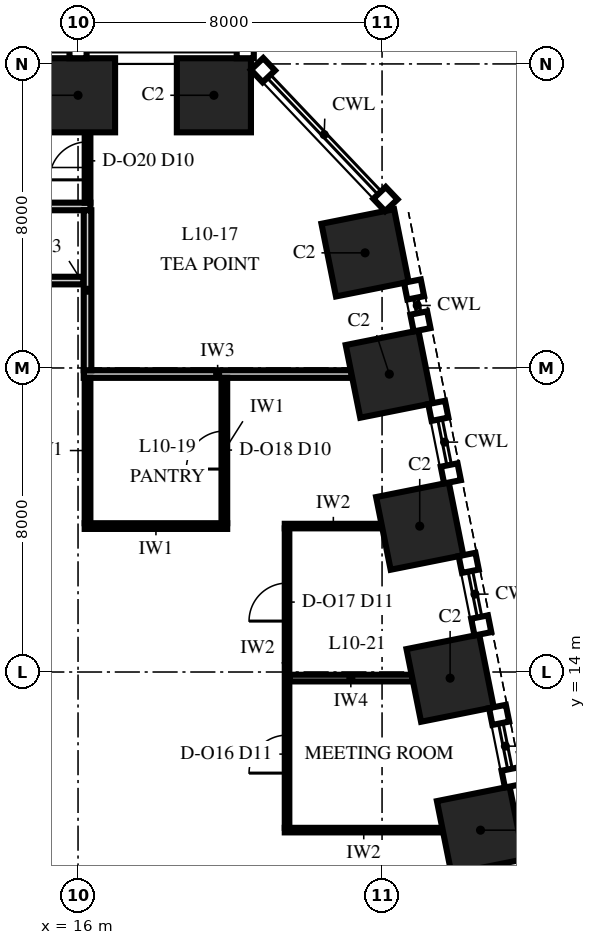
"""IFC4 building model, lengths in metres.
Left out: names, types, materials, properties, quantities, classifications, styles, units other than length and angle.
Written with IfcOpenShell. Run it as: python <this file> out.ifc"""

import sys

from ifc_helpers import new_model, si_unit, direction, frame, frame_2d, origin, origin_2d, place, context, subcontext, project, spatial, rectangle, extrude, element, fill, save


model = new_model("IFC4")
c1 = context("Model", 3, precision=1e-05, world=origin(), true_north=direction((0.0, 1.0)))
c2 = subcontext(c1, "Body", "Model", "MODEL_VIEW")
j1 = project(units=[si_unit("LENGTHUNIT", "METRE"), si_unit("PLANEANGLEUNIT", "RADIAN")], contexts=[c1])
p1 = place(None, origin())
s1 = spatial("IfcSite", under=j1, at=p1, CompositionType="ELEMENT")
p2 = place(p1, origin())
s2 = spatial("IfcBuilding", under=s1, at=p2, CompositionType="ELEMENT")
p3 = place(p2, frame((0.0, 0.0, 52.0)))
s3 = spatial("IfcBuildingStorey", under=s2, at=p3, CompositionType="ELEMENT", Elevation=52.0)
for number, where, z_axis, x_axis in (
    (1, (26.591, 9.838, 0.0), (0.0, 0.0, 1.0), (-0.196, 0.981, 0.0)),
    (2, (25.791, 13.838, 0.0), (0.0, 0.0, 1.0), (-0.196, 0.981, 0.0)),
    (3, (24.991, 17.838, 0.0), (0.0, 0.0, 1.0), (-0.196, 0.981, 0.0)),
    (4, (24.191, 21.838, 0.0), (0.0, 0.0, 1.0), (-0.196, 0.981, 0.0)),
    (5, (23.553, 25.029, 0.0), (0.0, 0.0, 1.0), (-0.196, 0.981, 0.0)),
    (6, (19.575, 29.175, 0.0), (0.0, 0.0, 1.0), (-1.0, 0.0, 0.0)),
    (7, (16.0, 29.175, 0.0), (0.0, 0.0, 1.0), (-1.0, 0.0, 0.0)),
):
    element("IfcColumn", number, at=place(p3, frame(where, z_axis=z_axis, x_axis=x_axis)), inside=s3, PredefinedType="COLUMN", context=c2, shape_type="SweptSolid", body=[
        extrude(rectangle(XDim=1.95, YDim=1.95, at=origin_2d()), origin(), (0.0, 0.0, 1.0), 4.0),
    ])
p4 = place(p3, frame((21.44, 9.84, 0.0), z_axis=(0.0, 0.0, 1.0), x_axis=(1.0, 0.0, 0.0)))
e8 = element("IfcWall", 8, at=p4, inside=s3, PredefinedType="PARTITIONING", context=c2, shape_type="SweptSolid", body=[
    extrude(rectangle(XDim=4.156, YDim=0.12, at=frame_2d((2.078, 0.0))), origin(), (0.0, 0.0, 1.0), 3.25),
])
p5 = place(p3, frame((21.56, 13.84, 0.0), z_axis=(0.0, 0.0, 1.0), x_axis=(1.0, 0.0, 0.0)))
e9 = element("IfcWall", 9, at=p5, inside=s3, PredefinedType="PARTITIONING", context=c2, shape_type="SweptSolid", body=[
    extrude(rectangle(XDim=3.236, YDim=0.175, at=frame_2d((1.618, 0.0))), origin(), (0.0, 0.0, 1.0), 3.25),
])
p6 = place(p3, frame((16.175, 17.84, 0.0), z_axis=(0.0, 0.0, 1.0), x_axis=(1.0, 0.0, 0.0)))
e10 = element("IfcWall", 10, at=p6, inside=s3, PredefinedType="PARTITIONING", context=c2, shape_type="SweptSolid", body=[
    extrude(rectangle(XDim=3.75, YDim=0.15, at=frame_2d((1.875, 0.0))), origin(), (0.0, 0.0, 1.0), 3.25),
])
p7 = place(p3, frame((21.44, 17.84, 0.0), z_axis=(0.0, 0.0, 1.0), x_axis=(1.0, 0.0, 0.0)))
e11 = element("IfcWall", 11, at=p7, inside=s3, PredefinedType="PARTITIONING", context=c2, shape_type="SweptSolid", body=[
    extrude(rectangle(XDim=2.556, YDim=0.12, at=frame_2d((1.278, 0.0))), origin(), (0.0, 0.0, 1.0), 3.25),
])
p8 = place(p3, frame((16.15, 21.84, 0.0), z_axis=(0.0, 0.0, 1.0), x_axis=(1.0, 0.0, 0.0)))
e12 = element("IfcWall", 12, at=p8, inside=s3, PredefinedType="PARTITIONING", context=c2, shape_type="SweptSolid", body=[
    extrude(rectangle(XDim=7.046, YDim=0.2, at=frame_2d((3.523, 0.0))), origin(), (0.0, 0.0, 1.0), 3.25),
])
p9 = place(p3, frame((14.33, 24.3, 0.0), z_axis=(0.0, 0.0, 1.0), x_axis=(1.0, 0.0, 0.0)))
e13 = element("IfcWall", 13, at=p9, inside=s3, PredefinedType="PARTITIONING", context=c2, shape_type="SweptSolid", body=[
    extrude(rectangle(XDim=1.82, YDim=0.2, at=frame_2d((0.91, 0.0))), origin(), (0.0, 0.0, 1.0), 3.4),
])
p10 = place(p3, frame((-16.31, 26.25, 0.0), z_axis=(0.0, 0.0, 1.0), x_axis=(1.0, 0.0, 0.0)))
e14 = element("IfcWall", 14, at=p10, inside=s3, PredefinedType="PARTITIONING", context=c2, shape_type="SweptSolid", body=[
    extrude(rectangle(XDim=32.635, YDim=0.2, at=frame_2d((16.317, 0.0))), origin(), (0.0, 0.0, 1.0), 3.4),
])
p11 = place(p10, frame((15.71, 0.0, 0.0)))
e15 = element("IfcOpeningElement", 15, at=p11, cuts=e14, PredefinedType="OPENING", context=c2, shape_type="SweptSolid", body=[
    extrude(rectangle(XDim=1.2, YDim=2.4, at=frame_2d((0.6, 1.2))), frame((0.0, 0.115, 0.0), z_axis=(0.0, -1.0, 0.0), x_axis=(1.0, 0.0, 0.0)), (0.0, 0.0, 1.0), 0.23),
])
p12 = place(p3, frame((16.25, 17.915, 0.0), z_axis=(0.0, 0.0, 1.0), x_axis=(0.0, 1.0, 0.0)))
e16 = element("IfcWall", 16, at=p12, inside=s3, PredefinedType="PARTITIONING", context=c2, shape_type="SweptSolid", body=[
    extrude(rectangle(XDim=3.825, YDim=0.15, at=frame_2d((1.913, 0.0))), origin(), (0.0, 0.0, 1.0), 3.25),
])
p13 = place(p3, frame((16.25, 21.94, 0.0), z_axis=(0.0, 0.0, 1.0), x_axis=(0.0, 1.0, 0.0)))
e17 = element("IfcWall", 17, at=p13, inside=s3, PredefinedType="PARTITIONING", context=c2, shape_type="SweptSolid", body=[
    extrude(rectangle(XDim=4.21, YDim=0.2, at=frame_2d((2.105, 0.0))), origin(), (0.0, 0.0, 1.0), 3.4),
])
p14 = place(p3, frame((16.25, 26.35, 0.0), z_axis=(0.0, 0.0, 1.0), x_axis=(0.0, 1.0, 0.0)))
e18 = element("IfcWall", 18, at=p14, inside=s3, PredefinedType="PARTITIONING", context=c2, shape_type="SweptSolid", body=[
    extrude(rectangle(XDim=1.85, YDim=0.15, at=frame_2d((0.925, 0.0))), origin(), (0.0, 0.0, 1.0), 3.85),
])
p15 = place(p14, frame((0.6, 0.0, 0.0)))
e19 = element("IfcOpeningElement", 19, at=p15, cuts=e18, PredefinedType="OPENING", context=c2, shape_type="SweptSolid", body=[
    extrude(rectangle(XDim=1.0, YDim=2.3, at=frame_2d((0.5, 1.15))), frame((0.0, 0.09, 0.0), z_axis=(0.0, -1.0, 0.0), x_axis=(1.0, 0.0, 0.0)), (0.0, 0.0, 1.0), 0.18),
])
p16 = place(p3, frame((19.85, 17.915, 0.0), z_axis=(0.0, 0.0, 1.0), x_axis=(0.0, 1.0, 0.0)))
e20 = element("IfcWall", 20, at=p16, inside=s3, PredefinedType="PARTITIONING", context=c2, shape_type="SweptSolid", body=[
    extrude(rectangle(XDim=3.825, YDim=0.15, at=frame_2d((1.913, 0.0))), origin(), (0.0, 0.0, 1.0), 3.25),
])
p17 = place(p16, frame((1.425, 0.0, 0.0)))
e21 = element("IfcOpeningElement", 21, at=p17, cuts=e20, PredefinedType="OPENING", context=c2, shape_type="SweptSolid", body=[
    extrude(rectangle(XDim=1.0, YDim=2.3, at=frame_2d((0.5, 1.15))), frame((0.0, 0.09, 0.0), z_axis=(0.0, -1.0, 0.0), x_axis=(1.0, 0.0, 0.0)), (0.0, 0.0, 1.0), 0.18),
])
p18 = place(p3, frame((21.5, 9.9, 0.0), z_axis=(0.0, 0.0, 1.0), x_axis=(0.0, 1.0, 0.0)))
e22 = element("IfcWall", 22, at=p18, inside=s3, PredefinedType="PARTITIONING", context=c2, shape_type="SweptSolid", body=[
    extrude(rectangle(XDim=7.88, YDim=0.12, at=frame_2d((3.94, 0.0))), origin(), (0.0, 0.0, 1.0), 3.25),
])
p19 = place(p18, frame((1.44, 0.0, 0.0)))
e23 = element("IfcOpeningElement", 23, at=p19, cuts=e22, PredefinedType="OPENING", context=c2, shape_type="SweptSolid", body=[
    extrude(rectangle(XDim=1.0, YDim=2.4, at=frame_2d((0.5, 1.2))), frame((0.0, 0.075, 0.0), z_axis=(0.0, -1.0, 0.0), x_axis=(1.0, 0.0, 0.0)), (0.0, 0.0, 1.0), 0.15),
])
p20 = place(p18, frame((5.44, 0.0, 0.0)))
e24 = element("IfcOpeningElement", 24, at=p20, cuts=e22, PredefinedType="OPENING", context=c2, shape_type="SweptSolid", body=[
    extrude(rectangle(XDim=1.0, YDim=2.4, at=frame_2d((0.5, 1.2))), frame((0.0, 0.075, 0.0), z_axis=(0.0, -1.0, 0.0), x_axis=(1.0, 0.0, 0.0)), (0.0, 0.0, 1.0), 0.15),
])
p21 = place(p19, origin())
e25 = element("IfcDoor", 25, at=p21, inside=s3, OperationType="SINGLE_SWING_RIGHT", PredefinedType="DOOR", context=c2, shape_type="SweptSolid", body=[
    extrude(rectangle(XDim=1.0, YDim=2.4, at=frame_2d((0.5, 1.2))), frame((0.0, 0.06, 0.0), z_axis=(0.0, -1.0, 0.0), x_axis=(1.0, 0.0, 0.0)), (0.0, 0.0, 1.0), 0.12),
])
fill(e23, e25)
p22 = place(p20, origin())
e26 = element("IfcDoor", 26, at=p22, inside=s3, OperationType="SINGLE_SWING_RIGHT", PredefinedType="DOOR", context=c2, shape_type="SweptSolid", body=[
    extrude(rectangle(XDim=1.0, YDim=2.4, at=frame_2d((0.5, 1.2))), frame((0.0, 0.06, 0.0), z_axis=(0.0, -1.0, 0.0), x_axis=(1.0, 0.0, 0.0)), (0.0, 0.0, 1.0), 0.12),
])
fill(e24, e26)
p23 = place(p17, origin())
e27 = element("IfcDoor", 27, at=p23, inside=s3, OperationType="SINGLE_SWING_LEFT", PredefinedType="DOOR", context=c2, shape_type="SweptSolid", body=[
    extrude(rectangle(XDim=1.0, YDim=2.3, at=frame_2d((0.5, 1.15))), frame((0.0, 0.075, 0.0), z_axis=(0.0, -1.0, 0.0), x_axis=(1.0, 0.0, 0.0)), (0.0, 0.0, 1.0), 0.149),
])
fill(e21, e27)
p24 = place(p15, origin())
e28 = element("IfcDoor", 28, at=p24, inside=s3, OperationType="SINGLE_SWING_LEFT", PredefinedType="DOOR", context=c2, shape_type="SweptSolid", body=[
    extrude(rectangle(XDim=1.0, YDim=2.3, at=frame_2d((0.5, 1.15))), frame((0.0, 0.075, 0.0), z_axis=(0.0, -1.0, 0.0), x_axis=(1.0, 0.0, 0.0)), (0.0, 0.0, 1.0), 0.149),
])
fill(e19, e28)
save(model, sys.argv[1])
